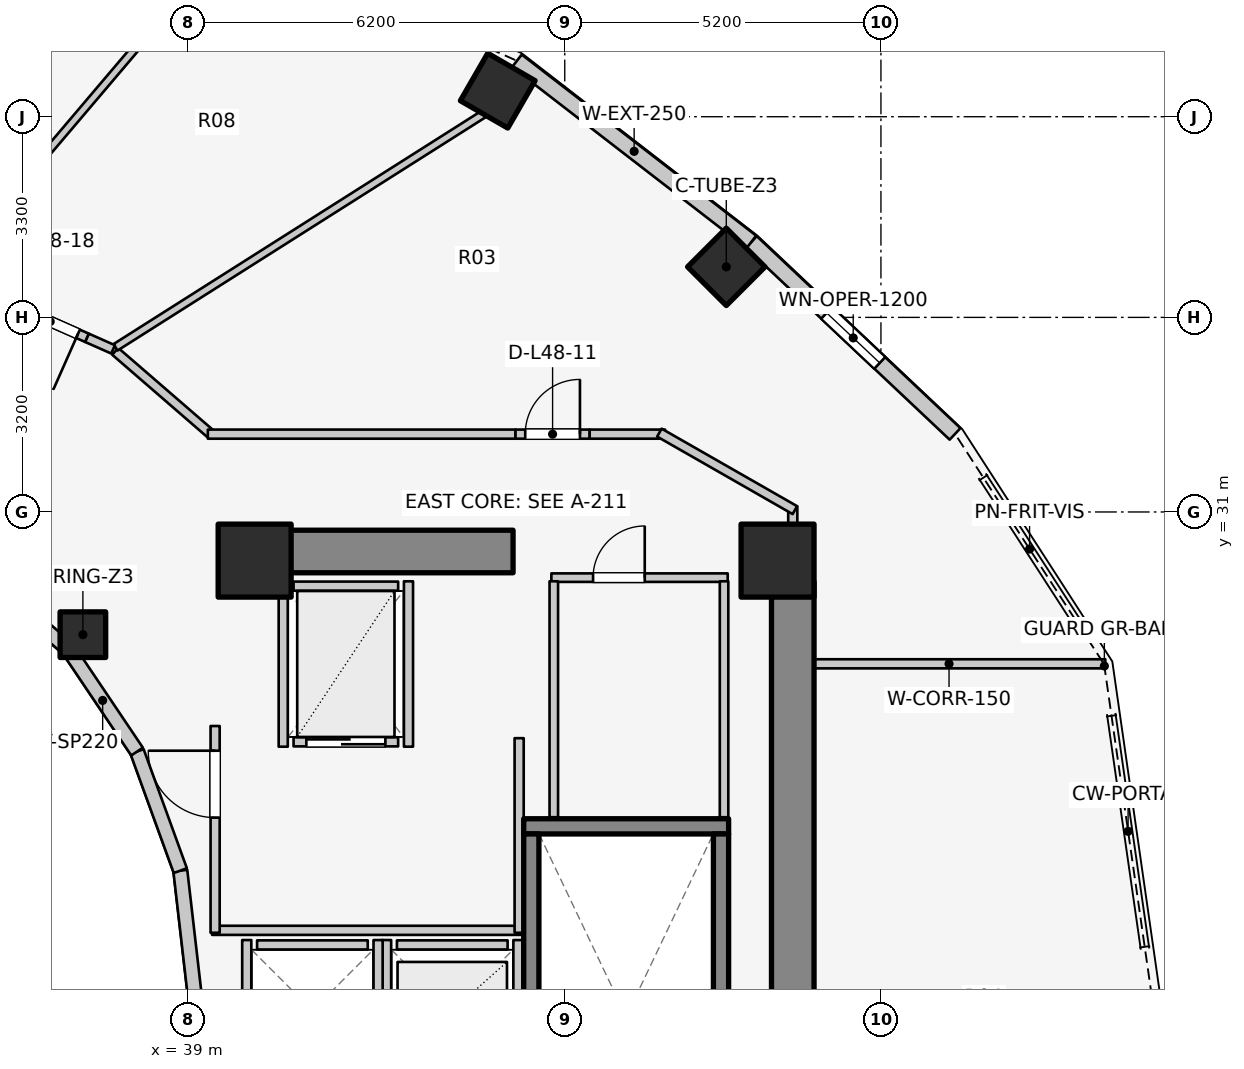
"""IFC4 building model, lengths in metres.
Left out: names, types, materials, properties, quantities, classifications, styles, units other than length and angle.
Written with IfcOpenShell. Run it as: python <this file> out.ifc"""

import sys

from ifc_helpers import new_model, si_unit, direction, frame, frame_2d, origin, origin_2d, place, context, subcontext, project, spatial, rectangle, extrude, element, fill, save


model = new_model("IFC4")
c1 = context("Model", 3, precision=1e-05, world=origin(), true_north=direction((0.0, 1.0)))
c2 = subcontext(c1, "Body", "Model", "MODEL_VIEW")
j1 = project(units=[si_unit("LENGTHUNIT", "METRE"), si_unit("PLANEANGLEUNIT", "RADIAN")], contexts=[c1])
p1 = place(None, origin())
s1 = spatial("IfcSite", under=j1, at=p1, CompositionType="ELEMENT")
p2 = place(p1, origin())
s2 = spatial("IfcBuilding", under=s1, at=p2, CompositionType="ELEMENT")
p3 = place(p2, frame((0.0, 0.0, 159.1)))
s3 = spatial("IfcBuildingStorey", under=s2, at=p3, CompositionType="ELEMENT", Elevation=159.1)
p4 = place(p3, frame((48.95, 17.05, 0.0), z_axis=(0.0, 0.0, 1.0), x_axis=(0.0, 1.0, 0.0)))
e1 = element("IfcWall", 1, at=p4, inside=s3, PredefinedType="SHEAR", context=c2, shape_type="SweptSolid", body=[
    extrude(rectangle(XDim=12.8, YDim=0.7, at=frame_2d((6.4, 0.0))), origin(), (0.0, 0.0, 1.0), 3.1),
])
p5 = place(p3, frame((39.85, 30.35, 0.0), z_axis=(0.0, 0.0, 1.0), x_axis=(1.0, 0.0, 0.0)))
e2 = element("IfcWall", 2, at=p5, inside=s3, PredefinedType="SHEAR", context=c2, shape_type="SweptSolid", body=[
    extrude(rectangle(XDim=4.5, YDim=0.7, at=frame_2d((2.25, 0.0))), origin(), (0.0, 0.0, 1.0), 3.1),
])
p6 = place(p3, frame((44.525, 25.83, 0.0), z_axis=(0.0, 0.0, 1.0), x_axis=(1.0, 0.0, 0.0)))
e3 = element("IfcWall", 3, at=p6, inside=s3, PredefinedType="SOLIDWALL", context=c2, shape_type="SweptSolid", body=[
    extrude(rectangle(XDim=3.37, YDim=0.25, at=frame_2d((1.685, 0.0))), origin(), (0.0, 0.0, 1.0), 3.1),
])
for number, where, z_axis, x_axis in (
    (4, (44.65, 17.895, 0.0), (0.0, 0.0, 1.0), (0.0, 1.0, 0.0)),
    (5, (47.77, 17.895, 0.0), (0.0, 0.0, 1.0), (0.0, 1.0, 0.0)),
):
    element("IfcWall", number, at=place(p3, frame(where, z_axis=z_axis, x_axis=x_axis)), inside=s3, PredefinedType="SOLIDWALL", context=c2, shape_type="SweptSolid", body=[
        extrude(rectangle(XDim=7.81, YDim=0.25, at=frame_2d((3.905, 0.0))), origin(), (0.0, 0.0, 1.0), 3.1),
    ])
for number, where, z_axis, x_axis in (
    (6, (48.7, 30.2, 0.0), (0.0, 0.0, 1.0), (1.0, 0.0, 0.0)),
    (7, (40.1, 30.2, 0.0), (0.0, 0.0, 1.0), (1.0, 0.0, 0.0)),
):
    element("IfcColumn", number, at=place(p3, frame(where, z_axis=z_axis, x_axis=x_axis)), inside=s3, PredefinedType="COLUMN", context=c2, shape_type="SweptSolid", body=[
        extrude(rectangle(XDim=1.2, YDim=1.2, at=origin_2d()), origin(), (0.0, 0.0, 1.0), 3.1),
    ])
p7 = place(p3, frame((37.275, 28.982, 0.0), z_axis=(0.0, 0.0, 1.0), x_axis=(1.0, 0.0, 0.0)))
e8 = element("IfcColumn", 8, at=p7, inside=s3, PredefinedType="COLUMN", context=c2, shape_type="SweptSolid", body=[
    extrude(rectangle(XDim=0.75, YDim=0.75, at=origin_2d()), origin(), (0.0, 0.0, 1.0), 3.1),
])
for number, where, z_axis, x_axis in (
    (9, (47.857, 35.031, 0.0), (0.0, 0.0, 1.0), (0.707, 0.707, 0.0)),
    (10, (44.098, 37.928, 0.0), (0.0, 0.0, 1.0), (0.5, 0.866, 0.0)),
):
    element("IfcColumn", number, at=place(p3, frame(where, z_axis=z_axis, x_axis=x_axis)), inside=s3, PredefinedType="COLUMN", context=c2, shape_type="SweptSolid", body=[
        extrude(rectangle(XDim=0.9, YDim=0.9, at=origin_2d()), origin(), (0.0, 0.0, 1.0), 3.1),
    ])
p8 = place(p3, frame((39.12, 23.0, 0.0), z_axis=(0.0, 0.0, 1.0), x_axis=(-0.114711713601, 0.993398823617, 0.0)))
e11 = element("IfcWall", 11, at=p8, inside=s3, PredefinedType="STANDARD", context=c2, shape_type="SweptSolid", body=[
    extrude(rectangle(XDim=2.115, YDim=0.23, at=frame_2d((1.058, 0.0))), origin(), (0.0, 0.0, 1.0), 2.56),
])
p9 = place(p3, frame((38.877, 25.102, 0.0), z_axis=(0.0, 0.0, 1.0), x_axis=(-0.341423187295, 0.93990968033, 0.0)))
e12 = element("IfcWall", 12, at=p9, inside=s3, PredefinedType="STANDARD", context=c2, shape_type="SweptSolid", body=[
    extrude(rectangle(XDim=2.084, YDim=0.23, at=frame_2d((1.042, 0.0))), origin(), (0.0, 0.0, 1.0), 2.56),
])
p10 = place(p3, frame((38.166, 27.06, 0.0), z_axis=(0.0, 0.0, 1.0), x_axis=(-0.558197800898, 0.829707909492, 0.0)))
e13 = element("IfcWall", 13, at=p10, inside=s3, PredefinedType="STANDARD", context=c2, shape_type="SweptSolid", body=[
    extrude(rectangle(XDim=2.027, YDim=0.23, at=frame_2d((1.013, 0.0))), origin(), (0.0, 0.0, 1.0), 1.22),
])
p11 = place(p3, frame((37.035, 28.742, 0.0), z_axis=(0.0, 0.0, 1.0), x_axis=(-0.752576694707, 0.658504607869, 0.0)))
e14 = element("IfcWall", 14, at=p11, inside=s3, PredefinedType="STANDARD", context=c2, shape_type="SweptSolid", body=[
    extrude(rectangle(XDim=1.959, YDim=0.23, at=frame_2d((0.98, 0.0))), origin(), (0.0, 0.0, 1.0), 1.22),
])
p12 = place(p3, frame((51.619, 32.284, 0.0), z_axis=(0.0, 0.0, 1.0), x_axis=(-0.727667301037, 0.68593024354, 0.0)))
e15 = element("IfcWall", 15, at=p12, inside=s3, PredefinedType="STANDARD", context=c2, shape_type="SweptSolid", body=[
    extrude(rectangle(XDim=4.604, YDim=0.26, at=frame_2d((2.302, 0.0))), origin(), (0.0, 0.0, 1.0), 1.22),
])
p13 = place(p12, frame((1.702, 0.0, 0.15)))
e16 = element("IfcOpeningElement", 16, at=p13, cuts=e15, PredefinedType="OPENING", context=c2, shape_type="SweptSolid", body=[
    extrude(rectangle(XDim=1.2, YDim=0.9, at=frame_2d((0.6, 0.45))), frame((0.0, 0.14, 0.0), z_axis=(0.0, -1.0, 0.0), x_axis=(1.0, 0.0, 0.0)), (0.0, 0.0, 1.0), 0.28),
])
p14 = place(p3, frame((48.269, 35.441, 0.0), z_axis=(0.0, 0.0, 1.0), x_axis=(-0.791460185804, 0.611220724687, 0.0)))
e17 = element("IfcWall", 17, at=p14, inside=s3, PredefinedType="STANDARD", context=c2, shape_type="SweptSolid", body=[
    extrude(rectangle(XDim=4.872, YDim=0.26, at=frame_2d((2.436, 0.0))), origin(), (0.0, 0.0, 1.0), 1.22),
])
p15 = place(p3, frame((42.44, 23.88, 0.0), z_axis=(0.0, 0.0, 1.0), x_axis=(1.0, 0.0, 0.0)))
e18 = element("IfcWall", 18, at=p15, inside=s3, PredefinedType="SOLIDWALL", context=c2, shape_type="SweptSolid", body=[
    extrude(rectangle(XDim=1.82, YDim=0.15, at=frame_2d((0.91, 0.0))), origin(), (0.0, 0.0, 1.0), 2.575),
])
for number, where, z_axis, x_axis in (
    (19, (42.27, 21.64, 0.0), (0.0, 0.0, 1.0), (0.0, 1.0, 0.0)),
    (20, (44.43, 21.64, 0.0), (0.0, 0.0, 1.0), (0.0, 1.0, 0.0)),
):
    element("IfcWall", number, at=place(p3, frame(where, z_axis=z_axis, x_axis=x_axis)), inside=s3, PredefinedType="SOLIDWALL", context=c2, shape_type="SweptSolid", body=[
        extrude(rectangle(XDim=2.32, YDim=0.15, at=frame_2d((1.16, 0.0))), origin(), (0.0, 0.0, 1.0), 2.575),
    ])
p16 = place(p3, frame((40.14, 23.88, 0.0), z_axis=(0.0, 0.0, 1.0), x_axis=(1.0, 0.0, 0.0)))
e21 = element("IfcWall", 21, at=p16, inside=s3, PredefinedType="SOLIDWALL", context=c2, shape_type="SweptSolid", body=[
    extrude(rectangle(XDim=1.82, YDim=0.15, at=frame_2d((0.91, 0.0))), origin(), (0.0, 0.0, 1.0), 2.12),
])
p17 = place(p3, frame((39.97, 21.64, 0.0), z_axis=(0.0, 0.0, 1.0), x_axis=(0.0, 1.0, 0.0)))
e22 = element("IfcWall", 22, at=p17, inside=s3, PredefinedType="SOLIDWALL", context=c2, shape_type="SweptSolid", body=[
    extrude(rectangle(XDim=2.32, YDim=0.15, at=frame_2d((1.16, 0.0))), origin(), (0.0, 0.0, 1.0), 2.12),
])
p18 = place(p3, frame((42.13, 21.64, 0.0), z_axis=(0.0, 0.0, 1.0), x_axis=(0.0, 1.0, 0.0)))
e23 = element("IfcWall", 23, at=p18, inside=s3, PredefinedType="SOLIDWALL", context=c2, shape_type="SweptSolid", body=[
    extrude(rectangle(XDim=2.32, YDim=0.15, at=frame_2d((1.16, 0.0))), origin(), (0.0, 0.0, 1.0), 2.575),
])
p19 = place(p3, frame((40.74, 27.22, 0.0), z_axis=(0.0, 0.0, 1.0), x_axis=(1.0, 0.0, 0.0)))
e24 = element("IfcWall", 24, at=p19, inside=s3, PredefinedType="SOLIDWALL", context=c2, shape_type="SweptSolid", body=[
    extrude(rectangle(XDim=1.72, YDim=0.15, at=frame_2d((0.86, 0.0))), origin(), (0.0, 0.0, 1.0), 2.575),
])
p20 = place(p19, frame((0.21, 0.0, 0.0)))
e25 = element("IfcOpeningElement", 25, at=p20, cuts=e24, PredefinedType="OPENING", context=c2, shape_type="SweptSolid", body=[
    extrude(rectangle(XDim=1.3, YDim=2.1, at=frame_2d((0.65, 1.05))), frame((0.0, 0.085, 0.0), z_axis=(0.0, -1.0, 0.0), x_axis=(1.0, 0.0, 0.0)), (0.0, 0.0, 1.0), 0.17),
])
p21 = place(p3, frame((40.74, 29.78, 0.0), z_axis=(0.0, 0.0, 1.0), x_axis=(1.0, 0.0, 0.0)))
e26 = element("IfcWall", 26, at=p21, inside=s3, PredefinedType="SOLIDWALL", context=c2, shape_type="SweptSolid", body=[
    extrude(rectangle(XDim=1.72, YDim=0.15, at=frame_2d((0.86, 0.0))), origin(), (0.0, 0.0, 1.0), 2.575),
])
for number, where, z_axis, x_axis in (
    (27, (40.57, 27.14, 0.0), (0.0, 0.0, 1.0), (0.0, 1.0, 0.0)),
    (28, (42.63, 27.14, 0.0), (0.0, 0.0, 1.0), (0.0, 1.0, 0.0)),
):
    element("IfcWall", number, at=place(p3, frame(where, z_axis=z_axis, x_axis=x_axis)), inside=s3, PredefinedType="SOLIDWALL", context=c2, shape_type="SweptSolid", body=[
        extrude(rectangle(XDim=2.72, YDim=0.15, at=frame_2d((1.36, 0.0))), origin(), (0.0, 0.0, 1.0), 2.575),
    ])
p22 = place(p3, frame((39.4, 24.12, 0.0), z_axis=(0.0, 0.0, 1.0), x_axis=(1.0, 0.0, 0.0)))
e29 = element("IfcWall", 29, at=p22, inside=s3, PredefinedType="PARTITIONING", context=c2, shape_type="SweptSolid", body=[
    extrude(rectangle(XDim=5.08, YDim=0.15, at=frame_2d((2.54, 0.0))), origin(), (0.0, 0.0, 1.0), 2.12),
])
p23 = place(p3, frame((44.45, 24.08, 0.0), z_axis=(0.0, 0.0, 1.0), x_axis=(0.0, 1.0, 0.0)))
e30 = element("IfcWall", 30, at=p23, inside=s3, PredefinedType="PARTITIONING", context=c2, shape_type="SweptSolid", body=[
    extrude(rectangle(XDim=3.2, YDim=0.15, at=frame_2d((1.6, 0.0))), origin(), (0.0, 0.0, 1.0), 2.575),
])
p24 = place(p3, frame((39.45, 24.08, 0.0), z_axis=(0.0, 0.0, 1.0), x_axis=(0.0, 1.0, 0.0)))
e31 = element("IfcWall", 31, at=p24, inside=s3, PredefinedType="PARTITIONING", context=c2, shape_type="SweptSolid", body=[
    extrude(rectangle(XDim=3.4, YDim=0.15, at=frame_2d((1.7, 0.0))), origin(), (0.0, 0.0, 1.0), 2.575),
])
p25 = place(p24, frame((1.894, 0.0, 0.0)))
e32 = element("IfcOpeningElement", 32, at=p25, cuts=e31, PredefinedType="OPENING", context=c2, shape_type="SweptSolid", body=[
    extrude(rectangle(XDim=1.1, YDim=2.1, at=frame_2d((0.55, 1.05))), frame((0.0, 0.085, 0.0), z_axis=(0.0, -1.0, 0.0), x_axis=(1.0, 0.0, 0.0)), (0.0, 0.0, 1.0), 0.17),
])
p26 = place(p3, frame((44.98, 29.92, 0.0), z_axis=(0.0, 0.0, 1.0), x_axis=(1.0, 0.0, 0.0)))
e33 = element("IfcWall", 33, at=p26, inside=s3, PredefinedType="PLUMBINGWALL", context=c2, shape_type="SweptSolid", body=[
    extrude(rectangle(XDim=2.9, YDim=0.14, at=frame_2d((1.45, 0.0))), origin(), (0.0, 0.0, 1.0), 2.575),
])
p27 = place(p26, frame((0.686, 0.0, 0.0)))
e34 = element("IfcOpeningElement", 34, at=p27, cuts=e33, PredefinedType="OPENING", context=c2, shape_type="SweptSolid", body=[
    extrude(rectangle(XDim=0.85, YDim=2.05, at=frame_2d((0.425, 1.025))), frame((0.0, 0.08, 0.0), z_axis=(0.0, -1.0, 0.0), x_axis=(1.0, 0.0, 0.0)), (0.0, 0.0, 1.0), 0.16),
])
for number, where, z_axis, x_axis in (
    (35, (45.02, 25.98, 0.0), (0.0, 0.0, 1.0), (0.0, 1.0, 0.0)),
    (36, (47.82, 25.98, 0.0), (0.0, 0.0, 1.0), (0.0, 1.0, 0.0)),
):
    element("IfcWall", number, at=place(p3, frame(where, z_axis=z_axis, x_axis=x_axis)), inside=s3, PredefinedType="PLUMBINGWALL", context=c2, shape_type="SweptSolid", body=[
        extrude(rectangle(XDim=3.88, YDim=0.14, at=frame_2d((1.94, 0.0))), origin(), (0.0, 0.0, 1.0), 2.575),
    ])
p28 = place(p3, frame((48.95, 28.503, 0.0), z_axis=(0.0, 0.0, 1.0), x_axis=(1.0, 0.0, 0.0)))
e37 = element("IfcWall", 37, at=p28, inside=s3, PredefinedType="PARTITIONING", context=c2, shape_type="SweptSolid", body=[
    extrude(rectangle(XDim=5.14, YDim=0.15, at=frame_2d((2.57, 0.0))), origin(), (0.0, 0.0, 1.0), 2.575),
])
p29 = place(p3, frame((48.95, 29.8, 0.0), z_axis=(0.0, 0.0, 1.0), x_axis=(0.0, 1.0, 0.0)))
e38 = element("IfcWall", 38, at=p29, inside=s3, PredefinedType="PARTITIONING", context=c2, shape_type="SweptSolid", body=[
    extrude(rectangle(XDim=1.29, YDim=0.15, at=frame_2d((0.645, 0.0))), origin(), (0.0, 0.0, 1.0), 1.22),
])
p30 = place(p3, frame((37.807, 33.642, 0.0), z_axis=(0.0, 0.0, 1.0), x_axis=(0.756055312247, -0.654507727092, 0.0)))
e39 = element("IfcWall", 39, at=p30, inside=s3, PredefinedType="PARTITIONING", context=c2, shape_type="SweptSolid", body=[
    extrude(rectangle(XDim=2.111, YDim=0.15, at=frame_2d((1.055, 0.0))), origin(), (0.0, 0.0, 1.0), 1.22),
])
p31 = place(p3, frame((39.33, 32.28, 0.0), z_axis=(0.0, 0.0, 1.0), x_axis=(1.0, 0.0, 0.0)))
e40 = element("IfcWall", 40, at=p31, inside=s3, PredefinedType="PARTITIONING", context=c2, shape_type="SweptSolid", body=[
    extrude(rectangle(XDim=5.06, YDim=0.15, at=frame_2d((2.53, 0.0))), origin(), (0.0, 0.0, 1.0), 1.22),
])
p32 = place(p3, frame((44.39, 32.28, 0.0), z_axis=(0.0, 0.0, 1.0), x_axis=(1.0, 0.0, 0.0)))
e41 = element("IfcWall", 41, at=p32, inside=s3, PredefinedType="PARTITIONING", context=c2, shape_type="SweptSolid", body=[
    extrude(rectangle(XDim=1.22, YDim=0.15, at=frame_2d((0.61, 0.0))), origin(), (0.0, 0.0, 1.0), 2.16),
])
p33 = place(p32, frame((0.16, 0.0, 0.0)))
e42 = element("IfcOpeningElement", 42, at=p33, cuts=e41, PredefinedType="OPENING", context=c2, shape_type="SweptSolid", body=[
    extrude(rectangle(XDim=0.9, YDim=2.1, at=frame_2d((0.45, 1.05))), frame((0.0, 0.085, 0.0), z_axis=(0.0, -1.0, 0.0), x_axis=(1.0, 0.0, 0.0)), (0.0, 0.0, 1.0), 0.17),
])
p34 = place(p3, frame((45.61, 32.28, 0.0), z_axis=(0.0, 0.0, 1.0), x_axis=(1.0, 0.0, 0.0)))
e43 = element("IfcWall", 43, at=p34, inside=s3, PredefinedType="PARTITIONING", context=c2, shape_type="SweptSolid", body=[
    extrude(rectangle(XDim=1.24, YDim=0.15, at=frame_2d((0.62, 0.0))), origin(), (0.0, 0.0, 1.0), 2.575),
])
p35 = place(p3, frame((46.757, 32.305, 0.0), z_axis=(0.0, 0.0, 1.0), x_axis=(0.867991349648, -0.496579315857, 0.0)))
e44 = element("IfcWall", 44, at=p35, inside=s3, PredefinedType="PARTITIONING", context=c2, shape_type="SweptSolid", body=[
    extrude(rectangle(XDim=2.567, YDim=0.15, at=frame_2d((1.283, 0.0))), origin(), (0.0, 0.0, 1.0), 1.22),
])
p36 = place(p3, frame((37.812, 33.708, 0.0), z_axis=(0.0, 0.0, 1.0), x_axis=(0.844640430122, 0.535334048799, 0.0)))
e45 = element("IfcWall", 45, at=p36, inside=s3, PredefinedType="PARTITIONING", context=c2, shape_type="SweptSolid", body=[
    extrude(rectangle(XDim=7.188, YDim=0.125, at=frame_2d((3.594, 0.0))), origin(), (0.0, 0.0, 1.0), 1.22),
])
p37 = place(p3, frame((35.02, 34.952, 0.0), z_axis=(0.0, 0.0, 1.0), x_axis=(0.647173462792, 0.762342776615, 0.0)))
e46 = element("IfcWall", 46, at=p37, inside=s3, PredefinedType="PARTITIONING", context=c2, shape_type="SweptSolid", body=[
    extrude(rectangle(XDim=6.253, YDim=0.125, at=frame_2d((3.127, 0.0))), origin(), (0.0, 0.0, 1.0), 1.22),
])
p38 = place(p3, frame((37.772, 33.674, 0.0), z_axis=(0.0, 0.0, 1.0), x_axis=(-0.914387769504, 0.404839482983, 0.0)))
e47 = element("IfcWall", 47, at=p38, inside=s3, PredefinedType="PARTITIONING", context=c2, shape_type="SweptSolid", body=[
    extrude(rectangle(XDim=0.471, YDim=0.15, at=frame_2d((0.235, 0.0))), origin(), (0.0, 0.0, 1.0), 2.575),
])
p39 = place(p3, frame((37.341, 33.865, 0.0), z_axis=(0.0, 0.0, 1.0), x_axis=(-0.914314172667, 0.405005671145, 0.0)))
e48 = element("IfcWall", 48, at=p39, inside=s3, PredefinedType="PARTITIONING", context=c2, shape_type="SweptSolid", body=[
    extrude(rectangle(XDim=1.32, YDim=0.15, at=frame_2d((0.66, 0.0))), origin(), (0.0, 0.0, 1.0), 2.16),
])
p40 = place(p39, frame((0.16, 0.0, 0.0)))
e49 = element("IfcOpeningElement", 49, at=p40, cuts=e48, PredefinedType="OPENING", context=c2, shape_type="SweptSolid", body=[
    extrude(rectangle(XDim=1.0, YDim=2.1, at=frame_2d((0.5, 1.05))), frame((0.0, 0.085, 0.0), z_axis=(0.0, -1.0, 0.0), x_axis=(1.0, 0.0, 0.0)), (0.0, 0.0, 1.0), 0.17),
])
p41 = place(p13, origin())
e50 = element("IfcWindow", 50, at=p41, inside=s3, PartitioningType="SINGLE_PANEL", PredefinedType="WINDOW", context=c2, shape_type="SweptSolid", body=[
    extrude(rectangle(XDim=1.2, YDim=0.9, at=frame_2d((0.6, 0.45))), frame((0.0, 0.03, 0.0), z_axis=(0.0, -1.0, 0.0), x_axis=(1.0, 0.0, 0.0)), (0.0, 0.0, 1.0), 0.06),
])
fill(e16, e50)
p42 = place(p20, origin())
e51 = element("IfcDoor", 51, at=p42, inside=s3, OperationType="DOUBLE_DOOR_SLIDING", PredefinedType="DOOR", context=c2, shape_type="SweptSolid", body=[
    extrude(rectangle(XDim=1.3, YDim=2.1, at=frame_2d((0.65, 1.05))), frame((0.0, 0.025, 0.0), z_axis=(0.0, -1.0, 0.0), x_axis=(1.0, 0.0, 0.0)), (0.0, 0.0, 1.0), 0.05),
])
fill(e25, e51)
p43 = place(p25, origin())
e52 = element("IfcDoor", 52, at=p43, inside=s3, OperationType="SINGLE_SWING_RIGHT", PredefinedType="DOOR", context=c2, shape_type="SweptSolid", body=[
    extrude(rectangle(XDim=1.1, YDim=2.1, at=frame_2d((0.55, 1.05))), frame((0.0, 0.025, 0.0), z_axis=(0.0, -1.0, 0.0), x_axis=(1.0, 0.0, 0.0)), (0.0, 0.0, 1.0), 0.05),
])
fill(e32, e52)
p44 = place(p27, origin())
e53 = element("IfcDoor", 53, at=p44, inside=s3, OperationType="SINGLE_SWING_RIGHT", PredefinedType="DOOR", context=c2, shape_type="SweptSolid", body=[
    extrude(rectangle(XDim=0.85, YDim=2.05, at=frame_2d((0.425, 1.025))), frame((0.0, 0.025, 0.0), z_axis=(0.0, -1.0, 0.0), x_axis=(1.0, 0.0, 0.0)), (0.0, 0.0, 1.0), 0.05),
])
fill(e34, e53)
p45 = place(p33, origin())
e54 = element("IfcDoor", 54, at=p45, inside=s3, OperationType="SINGLE_SWING_RIGHT", PredefinedType="DOOR", context=c2, shape_type="SweptSolid", body=[
    extrude(rectangle(XDim=0.9, YDim=2.1, at=frame_2d((0.45, 1.05))), frame((0.0, 0.025, 0.0), z_axis=(0.0, -1.0, 0.0), x_axis=(1.0, 0.0, 0.0)), (0.0, 0.0, 1.0), 0.05),
])
fill(e42, e54)
p46 = place(p40, origin())
e55 = element("IfcDoor", 55, at=p46, inside=s3, OperationType="SINGLE_SWING_LEFT", PredefinedType="DOOR", context=c2, shape_type="SweptSolid", body=[
    extrude(rectangle(XDim=1.0, YDim=2.1, at=frame_2d((0.5, 1.05))), frame((0.0, 0.025, 0.0), z_axis=(0.0, -1.0, 0.0), x_axis=(1.0, 0.0, 0.0)), (0.0, 0.0, 1.0), 0.05),
])
fill(e49, e55)
save(model, sys.argv[1])
